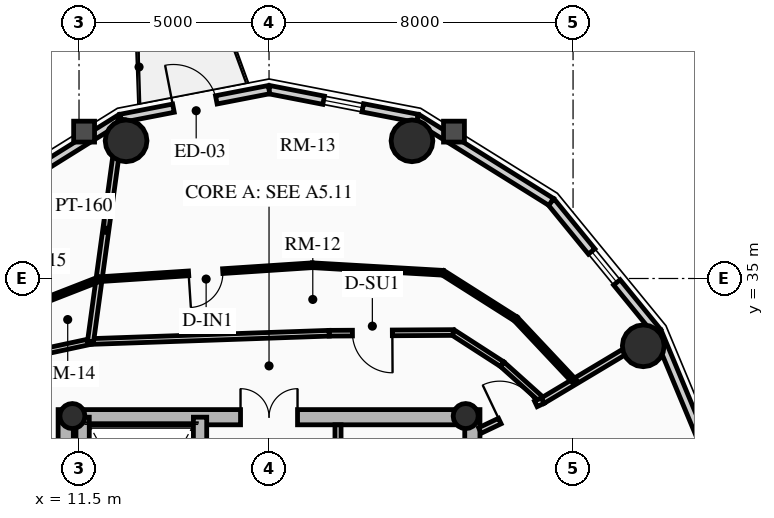
"""IFC4 building model, lengths in metres.
Left out: names, types, materials, properties, quantities, classifications, styles, units other than length and angle.
Written with IfcOpenShell. Run it as: python <this file> out.ifc"""

import sys

from ifc_helpers import new_model, si_unit, direction, frame, frame_2d, origin, origin_2d, place, context, subcontext, project, spatial, rectangle, circle, hollow_circle, extrude, source, transform, mapped, element, fill, save


model = new_model("IFC4")
c1 = context("Model", 3, precision=1e-05, world=origin(), true_north=direction((0.0, 1.0)))
c2 = subcontext(c1, "Body", "Model", "MODEL_VIEW")
j1 = project(units=[si_unit("LENGTHUNIT", "METRE"), si_unit("PLANEANGLEUNIT", "RADIAN")], contexts=[c1])
p1 = place(None, origin())
s1 = spatial("IfcSite", under=j1, at=p1, CompositionType="ELEMENT")
p2 = place(p1, origin())
s2 = spatial("IfcBuilding", under=s1, at=p2, CompositionType="ELEMENT")
p3 = place(p2, frame((0.0, 0.0, 222.85)))
s3 = spatial("IfcBuildingStorey", under=s2, at=p3, CompositionType="ELEMENT", Elevation=222.85)
for number, where, z_axis, x_axis in (
    (1, (11.15, 17.45, 0.0), (0.0, 0.0, 1.0), (0.0, 1.0, 0.0)),
    (2, (21.85, 17.45, 0.0), (0.0, 0.0, 1.0), (0.0, 1.0, 0.0)),
):
    element("IfcWall", number, at=place(p3, frame(where, z_axis=z_axis, x_axis=x_axis)), inside=s3, PredefinedType="SHEAR", context=c2, shape_type="SweptSolid", body=[
        extrude(rectangle(XDim=14.1, YDim=0.4, at=frame_2d((7.05, 0.0))), origin(), (0.0, 0.0, 1.0), 3.2),
    ])
p4 = place(p3, frame((11.15, 31.35, 0.0), z_axis=(0.0, 0.0, 1.0), x_axis=(1.0, 0.0, 0.0)))
e3 = element("IfcWall", 3, at=p4, inside=s3, PredefinedType="SHEAR", context=c2, shape_type="SweptSolid", body=[
    extrude(rectangle(XDim=10.7, YDim=0.4, at=frame_2d((5.35, 0.0))), origin(), (0.0, 0.0, 1.0), 3.2),
])
m1 = source(origin(), c2, "Body", "SweptSolid", [
    extrude(rectangle(XDim=1.5, YDim=2.02, at=frame_2d((0.75, 1.01))), frame((0.0, 0.21, 0.0), z_axis=(0.0, -1.0, 0.0), x_axis=(1.0, 0.0, 0.0)), (0.0, 0.0, 1.0), 0.42),
])
p5 = place(p4, frame((4.6, 0.0, 0.0)))
e4 = element("IfcOpeningElement", 4, at=p5, cuts=e3, PredefinedType="OPENING", context=c2, shape_type="MappedRepresentation", body=[
    mapped(m1, transform((0.0, 0.0, 0.0), x_axis=(1.0, 0.0, 0.0), y_axis=(0.0, 1.0, 0.0), z_axis=(0.0, 0.0, 1.0), scale=1.0)),
])
p6 = place(p3, frame((14.685, 17.65, 0.0), z_axis=(0.0, 0.0, 1.0), x_axis=(0.0, 1.0, 0.0)))
e5 = element("IfcWall", 5, at=p6, inside=s3, PredefinedType="SHEAR", context=c2, shape_type="SweptSolid", body=[
    extrude(rectangle(XDim=13.7, YDim=0.35, at=frame_2d((6.85, 0.0))), origin(), (0.0, 0.0, 1.0), 3.2),
])
m2 = source(origin(), c2, "Body", "SweptSolid", [
    extrude(rectangle(XDim=1.1, YDim=2.015, at=frame_2d((0.55, 1.007))), frame((0.0, 0.185, 0.0), z_axis=(0.0, -1.0, 0.0), x_axis=(1.0, 0.0, 0.0)), (0.0, 0.0, 1.0), 0.37),
])
p7 = place(p6, frame((4.85, 0.0, 0.0)))
e6 = element("IfcOpeningElement", 6, at=p7, cuts=e5, PredefinedType="OPENING", context=c2, shape_type="MappedRepresentation", body=[
    mapped(m2, transform((0.0, 0.0, 0.0), x_axis=(1.0, 0.0, 0.0), y_axis=(0.0, 1.0, 0.0), z_axis=(0.0, 0.0, 1.0), scale=1.0)),
])
p8 = place(p6, frame((0.625, 0.0, 0.0)))
e7 = element("IfcOpeningElement", 7, at=p8, cuts=e5, PredefinedType="OPENING", context=c2, shape_type="MappedRepresentation", body=[
    mapped(m2, transform((0.0, 0.0, 0.0), x_axis=(1.0, 0.0, 0.0), y_axis=(0.0, 1.0, 0.0), z_axis=(0.0, 0.0, 1.0), scale=1.0)),
])
p9 = place(p6, frame((2.625, 0.0, 0.0)))
e8 = element("IfcOpeningElement", 8, at=p9, cuts=e5, PredefinedType="OPENING", context=c2, shape_type="MappedRepresentation", body=[
    mapped(m2, transform((0.0, 0.0, 0.0), x_axis=(1.0, 0.0, 0.0), y_axis=(0.0, 1.0, 0.0), z_axis=(0.0, 0.0, 1.0), scale=1.0)),
])
m3 = source(origin(), c2, "Body", "SweptSolid", [
    extrude(rectangle(XDim=1.15, YDim=2.02, at=frame_2d((0.575, 1.01))), frame((0.0, 0.185, 0.0), z_axis=(0.0, -1.0, 0.0), x_axis=(1.0, 0.0, 0.0)), (0.0, 0.0, 1.0), 0.37),
])
p10 = place(p6, frame((7.27, 0.0, 0.0)))
e9 = element("IfcOpeningElement", 9, at=p10, cuts=e5, PredefinedType="OPENING", context=c2, shape_type="MappedRepresentation", body=[
    mapped(m3, transform((0.0, 0.0, 0.0), x_axis=(1.0, 0.0, 0.0), y_axis=(0.0, 1.0, 0.0), z_axis=(0.0, 0.0, 1.0), scale=1.0)),
])
p11 = place(p3, frame((11.595, 24.655, 0.0), z_axis=(0.0, 0.0, 1.0), x_axis=(0.0, 1.0, 0.0)))
e10 = element("IfcWall", 10, at=p11, inside=s3, PredefinedType="SHEAR", context=c2, shape_type="SweptSolid", body=[
    extrude(rectangle(XDim=6.695, YDim=0.35, at=frame_2d((3.348, 0.0))), origin(), (0.0, 0.0, 1.0), 3.2),
])
for number, where, z_axis, x_axis in (
    (11, (11.325, 31.38, 0.0), (0.0, 0.0, 1.0), (1.0, 0.0, 0.0)),
    (12, (21.675, 31.38, 0.0), (0.0, 0.0, 1.0), (1.0, 0.0, 0.0)),
):
    element("IfcColumn", number, at=place(p3, frame(where, z_axis=z_axis, x_axis=x_axis)), inside=s3, PredefinedType="COLUMN", context=c2, shape_type="SweptSolid", body=[
        extrude(hollow_circle(Radius=0.33, WallThickness=0.025, at=origin_2d()), origin(), (0.0, 0.0, 1.0), 3.2),
    ])
for number, where, z_axis, x_axis in (
    (13, (26.347, 33.229, 0.0), (0.0, 0.0, 1.0), (1.0, 0.0, 0.0)),
    (14, (20.261, 38.623, 0.0), (0.0, 0.0, 1.0), (1.0, 0.0, 0.0)),
    (15, (12.739, 38.623, 0.0), (0.0, 0.0, 1.0), (1.0, 0.0, 0.0)),
):
    element("IfcColumn", number, at=place(p3, frame(where, z_axis=z_axis, x_axis=x_axis)), inside=s3, PredefinedType="USERDEFINED", context=c2, shape_type="SweptSolid", body=[
        extrude(circle(Radius=0.55, at=origin_2d()), origin(), (0.0, 0.0, 1.0), 3.2),
    ])
p12 = place(p3, frame((26.718, 33.593, 0.0), z_axis=(0.0, 0.0, 1.0), x_axis=(0.384036305194, -0.923317993052, 0.0)))
e16 = element("IfcWall", 16, at=p12, inside=s3, PredefinedType="SOLIDWALL", context=c2, shape_type="SweptSolid", body=[
    extrude(rectangle(XDim=4.671, YDim=0.22, at=frame_2d((2.335, 0.0))), origin(), (0.0, 0.0, 1.0), 2.612),
])
p13 = place(p3, frame((23.924, 37.015, 0.0), z_axis=(0.0, 0.0, 1.0), x_axis=(0.632467166636, -0.774587169483, 0.0)))
e17 = element("IfcWall", 17, at=p13, inside=s3, PredefinedType="SOLIDWALL", context=c2, shape_type="SweptSolid", body=[
    extrude(rectangle(XDim=4.418, YDim=0.22, at=frame_2d((2.209, 0.0))), origin(), (0.0, 0.0, 1.0), 2.612),
])
m4 = source(origin(), c2, "Body", "SweptSolid", [
    extrude(rectangle(XDim=1.05, YDim=1.3, at=frame_2d((0.525, 0.65))), frame((0.0, 0.12, 0.0), z_axis=(0.0, -1.0, 0.0), x_axis=(1.0, 0.0, 0.0)), (0.0, 0.0, 1.0), 0.24),
])
p14 = place(p13, frame((1.684, 0.0, 0.65)))
e18 = element("IfcOpeningElement", 18, at=p14, cuts=e17, PredefinedType="OPENING", context=c2, shape_type="MappedRepresentation", body=[
    mapped(m4, transform((0.0, 0.0, 0.0), x_axis=(1.0, 0.0, 0.0), y_axis=(0.0, 1.0, 0.0), z_axis=(0.0, 0.0, 1.0), scale=1.0)),
])
p15 = place(p3, frame((20.403, 39.213, 0.0), z_axis=(0.0, 0.0, 1.0), x_axis=(0.848318713376, -0.529485939886, 0.0)))
e19 = element("IfcWall", 19, at=p15, inside=s3, PredefinedType="SOLIDWALL", context=c2, shape_type="SweptSolid", body=[
    extrude(rectangle(XDim=4.15, YDim=0.22, at=frame_2d((2.075, 0.0))), origin(), (0.0, 0.0, 1.0), 2.612),
])
p16 = place(p3, frame((16.5, 39.97, 0.0), z_axis=(0.0, 0.0, 1.0), x_axis=(0.981700307484, -0.190432419211, 0.0)))
e20 = element("IfcWall", 20, at=p16, inside=s3, PredefinedType="SOLIDWALL", context=c2, shape_type="SweptSolid", body=[
    extrude(rectangle(XDim=3.976, YDim=0.22, at=frame_2d((1.988, 0.0))), origin(), (0.0, 0.0, 1.0), 2.612),
])
p17 = place(p16, frame((1.463, 0.0, 0.65)))
e21 = element("IfcOpeningElement", 21, at=p17, cuts=e20, PredefinedType="OPENING", context=c2, shape_type="MappedRepresentation", body=[
    mapped(m4, transform((0.0, 0.0, 0.0), x_axis=(1.0, 0.0, 0.0), y_axis=(0.0, 1.0, 0.0), z_axis=(0.0, 0.0, 1.0), scale=1.0)),
])
p18 = place(p3, frame((12.597, 39.213, 0.0), z_axis=(0.0, 0.0, 1.0), x_axis=(0.981700307484, 0.190432419211, 0.0)))
e22 = element("IfcWall", 22, at=p18, inside=s3, PredefinedType="SOLIDWALL", context=c2, shape_type="SweptSolid", body=[
    extrude(rectangle(XDim=3.976, YDim=0.22, at=frame_2d((1.988, 0.0))), origin(), (0.0, 0.0, 1.0), 2.612),
])
m5 = source(origin(), c2, "Body", "SweptSolid", [
    extrude(rectangle(XDim=1.15, YDim=2.005, at=frame_2d((0.575, 1.002))), frame((0.0, 0.12, 0.0), z_axis=(0.0, -1.0, 0.0), x_axis=(1.0, 0.0, 0.0)), (0.0, 0.0, 1.0), 0.24),
])
p19 = place(p18, frame((1.413, 0.0, 0.0)))
e23 = element("IfcOpeningElement", 23, at=p19, cuts=e22, PredefinedType="OPENING", context=c2, shape_type="MappedRepresentation", body=[
    mapped(m5, transform((0.0, 0.0, 0.0), x_axis=(1.0, 0.0, 0.0), y_axis=(0.0, 1.0, 0.0), z_axis=(0.0, 0.0, 1.0), scale=1.0)),
])
p20 = place(p3, frame((9.076, 37.015, 0.0), z_axis=(0.0, 0.0, 1.0), x_axis=(0.848318713376, 0.529485939886, 0.0)))
e24 = element("IfcWall", 24, at=p20, inside=s3, PredefinedType="SOLIDWALL", context=c2, shape_type="SweptSolid", body=[
    extrude(rectangle(XDim=4.15, YDim=0.22, at=frame_2d((2.075, 0.0))), origin(), (0.0, 0.0, 1.0), 2.612),
])
p21 = place(p3, frame((18.315, 27.25, 0.0), z_axis=(0.0, 0.0, 1.0), x_axis=(0.0, 1.0, 0.0)))
e25 = element("IfcWall", 25, at=p21, inside=s3, PredefinedType="PARTITIONING", context=c2, shape_type="SweptSolid", body=[
    extrude(rectangle(XDim=3.9, YDim=0.16, at=frame_2d((1.95, 0.0))), origin(), (0.0, 0.0, 1.0), 2.975),
])
m6 = source(origin(), c2, "Body", "SweptSolid", [
    extrude(rectangle(XDim=0.9, YDim=2.005, at=frame_2d((0.45, 1.002))), frame((0.0, 0.09, 0.0), z_axis=(0.0, -1.0, 0.0), x_axis=(1.0, 0.0, 0.0)), (0.0, 0.0, 1.0), 0.18),
])
p22 = place(p21, frame((0.55, 0.0, 0.0)))
e26 = element("IfcOpeningElement", 26, at=p22, cuts=e25, PredefinedType="OPENING", context=c2, shape_type="MappedRepresentation", body=[
    mapped(m6, transform((0.0, 0.0, 0.0), x_axis=(1.0, 0.0, 0.0), y_axis=(0.0, 1.0, 0.0), z_axis=(0.0, 0.0, 1.0), scale=1.0)),
])
p23 = place(p21, frame((2.35, 0.0, 0.0)))
e27 = element("IfcOpeningElement", 27, at=p23, cuts=e25, PredefinedType="OPENING", context=c2, shape_type="MappedRepresentation", body=[
    mapped(m6, transform((0.0, 0.0, 0.0), x_axis=(1.0, 0.0, 0.0), y_axis=(0.0, 1.0, 0.0), z_axis=(0.0, 0.0, 1.0), scale=1.0)),
])
p24 = place(p3, frame((23.701, 31.786, 0.0), z_axis=(0.0, 0.0, 1.0), x_axis=(-0.743742806382, 0.668465883913, 0.0)))
e28 = element("IfcWall", 28, at=p24, inside=s3, PredefinedType="PARTITIONING", context=c2, shape_type="SweptSolid", body=[
    extrude(rectangle(XDim=1.434, YDim=0.15, at=frame_2d((0.717, 0.0))), origin(), (0.0, 0.0, 1.0), 2.612),
])
p25 = place(p3, frame((22.635, 32.744, 0.0), z_axis=(0.0, 0.0, 1.0), x_axis=(-0.840119270642, 0.542401706391, 0.0)))
e29 = element("IfcWall", 29, at=p25, inside=s3, PredefinedType="PARTITIONING", context=c2, shape_type="SweptSolid", body=[
    extrude(rectangle(XDim=1.538, YDim=0.15, at=frame_2d((0.769, 0.0))), origin(), (0.0, 0.0, 1.0), 2.545),
])
p26 = place(p3, frame((21.344, 33.578, 0.0), z_axis=(0.0, 0.0, 1.0), x_axis=(-0.999984243152, -0.005613684, 0.0)))
e30 = element("IfcWall", 30, at=p26, inside=s3, PredefinedType="PARTITIONING", context=c2, shape_type="SweptSolid", body=[
    extrude(rectangle(XDim=3.262, YDim=0.15, at=frame_2d((1.631, 0.0))), origin(), (0.0, 0.0, 1.0), 2.612),
])
m7 = source(origin(), c2, "Body", "SweptSolid", [
    extrude(rectangle(XDim=1.05, YDim=2.015, at=frame_2d((0.525, 1.007))), frame((0.0, 0.085, 0.0), z_axis=(0.0, -1.0, 0.0), x_axis=(1.0, 0.0, 0.0)), (0.0, 0.0, 1.0), 0.17),
])
p27 = place(p26, frame((1.599, 0.0, 0.0)))
e31 = element("IfcOpeningElement", 31, at=p27, cuts=e30, PredefinedType="OPENING", context=c2, shape_type="MappedRepresentation", body=[
    mapped(m7, transform((0.0, 0.0, 0.0), x_axis=(1.0, 0.0, 0.0), y_axis=(0.0, 1.0, 0.0), z_axis=(0.0, 0.0, 1.0), scale=1.0)),
])
p28 = place(p3, frame((18.082, 33.56, 0.0), z_axis=(0.0, 0.0, 1.0), x_axis=(-0.999399009709, -0.034664382185, 0.0)))
e32 = element("IfcWall", 32, at=p28, inside=s3, PredefinedType="PARTITIONING", context=c2, shape_type="SweptSolid", body=[
    extrude(rectangle(XDim=6.282, YDim=0.15, at=frame_2d((3.141, 0.0))), origin(), (0.0, 0.0, 1.0), 2.545),
])
p29 = place(p3, frame((11.803, 33.342, 0.0), z_axis=(0.0, 0.0, 1.0), x_axis=(-0.977750742783, -0.209770076483, 0.0)))
e33 = element("IfcWall", 33, at=p29, inside=s3, PredefinedType="PARTITIONING", context=c2, shape_type="SweptSolid", body=[
    extrude(rectangle(XDim=1.868, YDim=0.15, at=frame_2d((0.934, 0.0))), origin(), (0.0, 0.0, 1.0), 2.545),
])
p30 = place(p3, frame((23.701, 31.786, 0.0), z_axis=(0.0, 0.0, 1.0), x_axis=(0.858059206709, 0.513550774298, 0.0)))
e34 = element("IfcWall", 34, at=p30, inside=s3, PredefinedType="PARTITIONING", context=c2, shape_type="SweptSolid", body=[
    extrude(rectangle(XDim=3.497, YDim=0.16, at=frame_2d((1.748, 0.0))), origin(), (0.0, 0.0, 1.0), 2.612),
])
p31 = place(p3, frame((11.803, 33.342, 0.0), z_axis=(0.0, 0.0, 1.0), x_axis=(0.135452591041, 0.990783828885, 0.0)))
e35 = element("IfcWall", 35, at=p31, inside=s3, PredefinedType="PARTITIONING", context=c2, shape_type="SweptSolid", body=[
    extrude(rectangle(XDim=5.906, YDim=0.16, at=frame_2d((2.953, 0.0))), origin(), (0.0, 0.0, 1.0), 2.612),
])
p32 = place(p3, frame((22.05, 31.0, 0.0), z_axis=(0.0, 0.0, 1.0), x_axis=(0.903013459407, 0.429612257891, 0.0)))
e36 = element("IfcWall", 36, at=p32, inside=s3, PredefinedType="PARTITIONING", context=c2, shape_type="SweptSolid", body=[
    extrude(rectangle(XDim=1.829, YDim=0.16, at=frame_2d((0.914, 0.0))), origin(), (0.0, 0.0, 1.0), 2.545),
])
m8 = source(origin(), c2, "Body", "SweptSolid", [
    extrude(rectangle(XDim=1.05, YDim=2.015, at=frame_2d((0.525, 1.007))), frame((0.0, 0.09, 0.0), z_axis=(0.0, -1.0, 0.0), x_axis=(1.0, 0.0, 0.0)), (0.0, 0.0, 1.0), 0.18),
])
p33 = place(p32, frame((0.579, 0.0, 0.0)))
e37 = element("IfcOpeningElement", 37, at=p33, cuts=e36, PredefinedType="OPENING", context=c2, shape_type="MappedRepresentation", body=[
    mapped(m8, transform((0.0, 0.0, 0.0), x_axis=(1.0, 0.0, 0.0), y_axis=(0.0, 1.0, 0.0), z_axis=(0.0, 0.0, 1.0), scale=1.0)),
])
p34 = place(p3, frame((24.542, 32.288, 0.0), z_axis=(0.0, 0.0, 1.0), x_axis=(-0.68501091047, 0.72853280814, 0.0)))
e38 = element("IfcWall", 38, at=p34, inside=s3, PredefinedType="PARTITIONING", context=c2, shape_type="SweptSolid", body=[
    extrude(rectangle(XDim=2.261, YDim=0.125, at=frame_2d((1.13, 0.0))), origin(), (0.0, 0.0, 1.0), 2.612),
])
p35 = place(p3, frame((22.993, 33.935, 0.0), z_axis=(0.0, 0.0, 1.0), x_axis=(-0.844312558894, 0.535851008112, 0.0)))
e39 = element("IfcWall", 39, at=p35, inside=s3, PredefinedType="PARTITIONING", context=c2, shape_type="SweptSolid", body=[
    extrude(rectangle(XDim=2.268, YDim=0.125, at=frame_2d((1.134, 0.0))), origin(), (0.0, 0.0, 1.0), 2.545),
])
p36 = place(p3, frame((21.078, 35.15, 0.0), z_axis=(0.0, 0.0, 1.0), x_axis=(-0.99833900121, 0.057612834184, 0.0)))
e40 = element("IfcWall", 40, at=p36, inside=s3, PredefinedType="PARTITIONING", context=c2, shape_type="SweptSolid", body=[
    extrude(rectangle(XDim=3.445, YDim=0.125, at=frame_2d((1.723, 0.0))), origin(), (0.0, 0.0, 1.0), 2.612),
])
p37 = place(p3, frame((17.639, 35.349, 0.0), z_axis=(0.0, 0.0, 1.0), x_axis=(-0.997849042159, -0.065553711275, 0.0)))
e41 = element("IfcWall", 41, at=p37, inside=s3, PredefinedType="PARTITIONING", context=c2, shape_type="SweptSolid", body=[
    extrude(rectangle(XDim=5.624, YDim=0.125, at=frame_2d((2.812, 0.0))), origin(), (0.0, 0.0, 1.0), 2.545),
])
m9 = source(origin(), c2, "Body", "SweptSolid", [
    extrude(rectangle(XDim=0.9, YDim=2.005, at=frame_2d((0.45, 1.002))), frame((0.0, 0.073, 0.0), z_axis=(0.0, -1.0, 0.0), x_axis=(1.0, 0.0, 0.0)), (0.0, 0.0, 1.0), 0.145),
])
p38 = place(p37, frame((2.362, 0.0, 0.0)))
e42 = element("IfcOpeningElement", 42, at=p38, cuts=e41, PredefinedType="OPENING", context=c2, shape_type="MappedRepresentation", body=[
    mapped(m9, transform((0.0, 0.0, 0.0), x_axis=(1.0, 0.0, 0.0), y_axis=(0.0, 1.0, 0.0), z_axis=(0.0, 0.0, 1.0), scale=1.0)),
])
p39 = place(p3, frame((12.027, 34.98, 0.0), z_axis=(0.0, 0.0, 1.0), x_axis=(-0.931701760683, -0.363224213317, 0.0)))
e43 = element("IfcWall", 43, at=p39, inside=s3, PredefinedType="PARTITIONING", context=c2, shape_type="SweptSolid", body=[
    extrude(rectangle(XDim=2.468, YDim=0.125, at=frame_2d((1.234, 0.0))), origin(), (0.0, 0.0, 1.0), 2.545),
])
m10 = source(origin(), c2, "Body", "SweptSolid", [
    extrude(rectangle(XDim=1.05, YDim=1.3, at=frame_2d((0.525, 0.65))), frame((0.0, 0.03, 0.0), z_axis=(0.0, -1.0, 0.0), x_axis=(1.0, 0.0, 0.0)), (0.0, 0.0, 1.0), 0.06),
])
p40 = place(p14, origin())
e44 = element("IfcWindow", 44, at=p40, inside=s3, PartitioningType="SINGLE_PANEL", PredefinedType="WINDOW", context=c2, shape_type="MappedRepresentation", body=[
    mapped(m10, transform((0.0, 0.0, 0.0), x_axis=(1.0, 0.0, 0.0), y_axis=(0.0, 1.0, 0.0), z_axis=(0.0, 0.0, 1.0), scale=1.0)),
])
fill(e18, e44)
p41 = place(p17, origin())
e45 = element("IfcWindow", 45, at=p41, inside=s3, PartitioningType="SINGLE_PANEL", PredefinedType="WINDOW", context=c2, shape_type="MappedRepresentation", body=[
    mapped(m10, transform((0.0, 0.0, 0.0), x_axis=(1.0, 0.0, 0.0), y_axis=(0.0, 1.0, 0.0), z_axis=(0.0, 0.0, 1.0), scale=1.0)),
])
fill(e21, e45)
m11 = source(origin(), c2, "Body", "SweptSolid", [
    extrude(rectangle(XDim=1.15, YDim=2.005, at=frame_2d((0.575, 1.002))), frame((0.0, 0.025, 0.0), z_axis=(0.0, -1.0, 0.0), x_axis=(1.0, 0.0, 0.0)), (0.0, 0.0, 1.0), 0.05),
])
p42 = place(p19, origin())
e46 = element("IfcDoor", 46, at=p42, inside=s3, OperationType="SINGLE_SWING_LEFT", PredefinedType="DOOR", context=c2, shape_type="MappedRepresentation", body=[
    mapped(m11, transform((0.0, 0.0, 0.0), x_axis=(1.0, 0.0, 0.0), y_axis=(0.0, 1.0, 0.0), z_axis=(0.0, 0.0, 1.0), scale=1.0)),
])
fill(e23, e46)
m12 = source(origin(), c2, "Body", "SweptSolid", [
    extrude(rectangle(XDim=1.5, YDim=2.02, at=frame_2d((0.75, 1.01))), frame((0.0, 0.025, 0.0), z_axis=(0.0, -1.0, 0.0), x_axis=(1.0, 0.0, 0.0)), (0.0, 0.0, 1.0), 0.05),
])
p43 = place(p5, origin())
e47 = element("IfcDoor", 47, at=p43, inside=s3, OperationType="DOUBLE_DOOR_SINGLE_SWING", PredefinedType="DOOR", context=c2, shape_type="MappedRepresentation", body=[
    mapped(m12, transform((0.0, 0.0, 0.0), x_axis=(1.0, 0.0, 0.0), y_axis=(0.0, 1.0, 0.0), z_axis=(0.0, 0.0, 1.0), scale=1.0)),
])
fill(e4, e47)
m13 = source(origin(), c2, "Body", "SweptSolid", [
    extrude(rectangle(XDim=1.05, YDim=2.015, at=frame_2d((0.525, 1.007))), frame((0.0, 0.025, 0.0), z_axis=(0.0, -1.0, 0.0), x_axis=(1.0, 0.0, 0.0)), (0.0, 0.0, 1.0), 0.05),
])
p44 = place(p33, origin())
e48 = element("IfcDoor", 48, at=p44, inside=s3, OperationType="SINGLE_SWING_LEFT", PredefinedType="DOOR", context=c2, shape_type="MappedRepresentation", body=[
    mapped(m13, transform((0.0, 0.0, 0.0), x_axis=(1.0, 0.0, 0.0), y_axis=(0.0, 1.0, 0.0), z_axis=(0.0, 0.0, 1.0), scale=1.0)),
])
fill(e37, e48)
p45 = place(p27, origin())
e49 = element("IfcDoor", 49, at=p45, inside=s3, OperationType="SINGLE_SWING_LEFT", PredefinedType="DOOR", context=c2, shape_type="MappedRepresentation", body=[
    mapped(m13, transform((0.0, 0.0, 0.0), x_axis=(1.0, 0.0, 0.0), y_axis=(0.0, 1.0, 0.0), z_axis=(0.0, 0.0, 1.0), scale=1.0)),
])
fill(e31, e49)
m14 = source(origin(), c2, "Body", "SweptSolid", [
    extrude(rectangle(XDim=0.9, YDim=2.005, at=frame_2d((0.45, 1.002))), frame((0.0, 0.025, 0.0), z_axis=(0.0, -1.0, 0.0), x_axis=(1.0, 0.0, 0.0)), (0.0, 0.0, 1.0), 0.05),
])
p46 = place(p38, origin())
e50 = element("IfcDoor", 50, at=p46, inside=s3, OperationType="SINGLE_SWING_RIGHT", PredefinedType="DOOR", context=c2, shape_type="MappedRepresentation", body=[
    mapped(m14, transform((0.0, 0.0, 0.0), x_axis=(1.0, 0.0, 0.0), y_axis=(0.0, 1.0, 0.0), z_axis=(0.0, 0.0, 1.0), scale=1.0)),
])
fill(e42, e50)
save(model, sys.argv[1])
